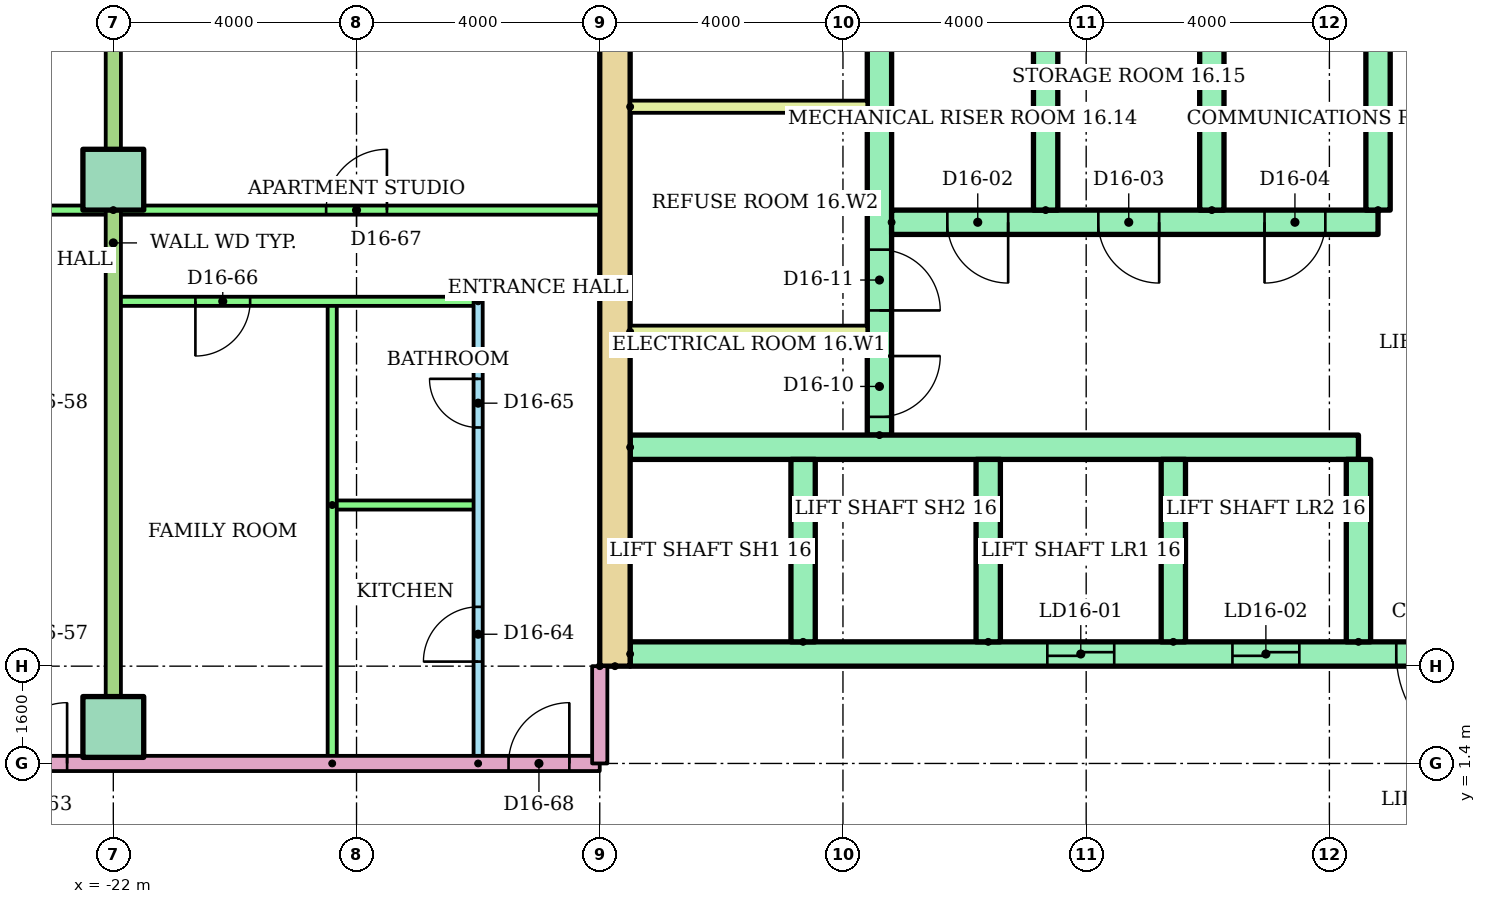
"""IFC4 building model, lengths in metres.
Left out: names, types, materials, properties, quantities, classifications, styles, units other than length and angle.
Written with IfcOpenShell. Run it as: python <this file> out.ifc"""

import sys

from ifc_helpers import new_model, si_unit, direction, frame, frame_2d, origin, origin_2d, place, context, subcontext, project, spatial, rectangle, extrude, element, fill, save


model = new_model("IFC4")
c1 = context("Model", 3, precision=1e-05, world=origin(), true_north=direction((0.0, 1.0)))
c2 = subcontext(c1, "Body", "Model", "MODEL_VIEW")
j1 = project(units=[si_unit("LENGTHUNIT", "METRE"), si_unit("PLANEANGLEUNIT", "RADIAN")], contexts=[c1])
p1 = place(None, origin())
s1 = spatial("IfcSite", under=j1, at=p1, CompositionType="ELEMENT")
p2 = place(p1, origin())
s2 = spatial("IfcBuilding", under=s1, at=p2, CompositionType="ELEMENT")
p3 = place(p2, frame((0.0, 0.0, 60.8)))
s3 = spatial("IfcBuildingStorey", under=s2, at=p3, CompositionType="ELEMENT", Elevation=60.8)
for number, where in (
    (1, (-22.0, 2.0, 0.0)),
    (2, (-22.0, 11.0, 0.0)),
):
    element("IfcColumn", number, at=place(p3, frame(where)), inside=s3, PredefinedType="COLUMN", context=c2, shape_type="SweptSolid", body=[
        extrude(rectangle(XDim=1.0, YDim=1.0, at=origin_2d()), origin(), (0.0, 0.0, 1.0), 3.2),
    ])
p4 = place(p3, frame((-13.75, 3.0, 0.0), z_axis=(0.0, 0.0, 1.0), x_axis=(0.0, 1.0, 0.0)))
e3 = element("IfcWall", 3, at=p4, inside=s3, PredefinedType="SHEAR", context=c2, shape_type="SweptSolid", body=[
    extrude(rectangle(XDim=17.0, YDim=0.5, at=frame_2d((8.5, 0.0))), origin(), (0.0, 0.0, 1.0), 2.8),
])
p5 = place(p3, frame((-9.4, 6.8, 0.0), z_axis=(0.0, 0.0, 1.0), x_axis=(0.0, 1.0, 0.0)))
e4 = element("IfcWall", 4, at=p5, inside=s3, PredefinedType="SHEAR", context=c2, shape_type="SweptSolid", body=[
    extrude(rectangle(XDim=12.7, YDim=0.4, at=frame_2d((6.35, 0.0))), origin(), (0.0, 0.0, 1.0), 2.8),
])
p6 = place(p5, frame((0.3, 0.0, 0.0)))
e5 = element("IfcOpeningElement", 5, at=p6, cuts=e4, PredefinedType="OPENING", context=c2, shape_type="SweptSolid", body=[
    extrude(rectangle(XDim=1.0, YDim=2.1, at=frame_2d((0.5, 1.05))), frame((0.0, 0.21, 0.0), z_axis=(0.0, -1.0, 0.0), x_axis=(1.0, 0.0, 0.0)), (0.0, 0.0, 1.0), 0.42),
])
p7 = place(p5, frame((2.05, 0.0, 0.0)))
e6 = element("IfcOpeningElement", 6, at=p7, cuts=e4, PredefinedType="OPENING", context=c2, shape_type="SweptSolid", body=[
    extrude(rectangle(XDim=1.0, YDim=2.1, at=frame_2d((0.5, 1.05))), frame((0.0, 0.21, 0.0), z_axis=(0.0, -1.0, 0.0), x_axis=(1.0, 0.0, 0.0)), (0.0, 0.0, 1.0), 0.42),
])
p8 = place(p5, frame((7.925, 0.0, 0.0)))
e7 = element("IfcOpeningElement", 7, at=p8, cuts=e4, PredefinedType="OPENING", context=c2, shape_type="SweptSolid", body=[
    extrude(rectangle(XDim=1.0, YDim=2.1, at=frame_2d((0.5, 1.05))), frame((0.0, 0.21, 0.0), z_axis=(0.0, -1.0, 0.0), x_axis=(1.0, 0.0, 0.0)), (0.0, 0.0, 1.0), 0.42),
])
p9 = place(p3, frame((-13.5, 3.2, 0.0)))
e8 = element("IfcWall", 8, at=p9, inside=s3, PredefinedType="SHEAR", context=c2, shape_type="SweptSolid", body=[
    extrude(rectangle(XDim=27.0, YDim=0.4, at=frame_2d((13.5, 0.0))), origin(), (0.0, 0.0, 1.0), 2.8),
])
p10 = place(p9, frame((6.861, 0.0, 0.0)))
e9 = element("IfcOpeningElement", 9, at=p10, cuts=e8, PredefinedType="OPENING", context=c2, shape_type="SweptSolid", body=[
    extrude(rectangle(XDim=1.1, YDim=2.1, at=frame_2d((0.55, 1.05))), frame((0.0, 0.21, 0.0), z_axis=(0.0, -1.0, 0.0), x_axis=(1.0, 0.0, 0.0)), (0.0, 0.0, 1.0), 0.42),
])
p11 = place(p9, frame((9.906, 0.0, 0.0)))
e10 = element("IfcOpeningElement", 10, at=p11, cuts=e8, PredefinedType="OPENING", context=c2, shape_type="SweptSolid", body=[
    extrude(rectangle(XDim=1.1, YDim=2.1, at=frame_2d((0.55, 1.05))), frame((0.0, 0.21, 0.0), z_axis=(0.0, -1.0, 0.0), x_axis=(1.0, 0.0, 0.0)), (0.0, 0.0, 1.0), 0.42),
])
p12 = place(p9, frame((15.994, 0.0, 0.0)))
e11 = element("IfcOpeningElement", 11, at=p12, cuts=e8, PredefinedType="OPENING", context=c2, shape_type="SweptSolid", body=[
    extrude(rectangle(XDim=1.1, YDim=2.1, at=frame_2d((0.55, 1.05))), frame((0.0, 0.21, 0.0), z_axis=(0.0, -1.0, 0.0), x_axis=(1.0, 0.0, 0.0)), (0.0, 0.0, 1.0), 0.42),
])
p13 = place(p9, frame((19.039, 0.0, 0.0)))
e12 = element("IfcOpeningElement", 12, at=p13, cuts=e8, PredefinedType="OPENING", context=c2, shape_type="SweptSolid", body=[
    extrude(rectangle(XDim=1.1, YDim=2.1, at=frame_2d((0.55, 1.05))), frame((0.0, 0.21, 0.0), z_axis=(0.0, -1.0, 0.0), x_axis=(1.0, 0.0, 0.0)), (0.0, 0.0, 1.0), 0.42),
])
p14 = place(p9, frame((12.6, 0.0, 0.0)))
e13 = element("IfcOpeningElement", 13, at=p14, cuts=e8, PredefinedType="OPENING", context=c2, shape_type="SweptSolid", body=[
    extrude(rectangle(XDim=1.8, YDim=2.1, at=frame_2d((0.9, 1.05))), frame((0.0, 0.21, 0.0), z_axis=(0.0, -1.0, 0.0), x_axis=(1.0, 0.0, 0.0)), (0.0, 0.0, 1.0), 0.42),
])
p15 = place(p3, frame((-13.5, 6.6, 0.0)))
e14 = element("IfcWall", 14, at=p15, inside=s3, PredefinedType="SHEAR", context=c2, shape_type="SweptSolid", body=[
    extrude(rectangle(XDim=11.978, YDim=0.4, at=frame_2d((5.989, 0.0))), origin(), (0.0, 0.0, 1.0), 2.8),
])
for number, where, z_axis, x_axis in (
    (15, (-10.656, 3.4, 0.0), (0.0, 0.0, 1.0), (0.0, 1.0, 0.0)),
    (16, (-7.611, 3.4, 0.0), (0.0, 0.0, 1.0), (0.0, 1.0, 0.0)),
    (17, (-4.567, 3.4, 0.0), (0.0, 0.0, 1.0), (0.0, 1.0, 0.0)),
    (18, (-1.522, 3.4, 0.0), (0.0, 0.0, 1.0), (0.0, 1.0, 0.0)),
):
    element("IfcWall", number, at=place(p3, frame(where, z_axis=z_axis, x_axis=x_axis)), inside=s3, PredefinedType="SHEAR", context=c2, shape_type="SweptSolid", body=[
        extrude(rectangle(XDim=3.0, YDim=0.4, at=frame_2d((1.5, 0.0))), origin(), (0.0, 0.0, 1.0), 2.8),
    ])
p16 = place(p3, frame((-9.2, 10.3, 0.0)))
e19 = element("IfcWall", 19, at=p16, inside=s3, PredefinedType="SHEAR", context=c2, shape_type="SweptSolid", body=[
    extrude(rectangle(XDim=8.0, YDim=0.4, at=frame_2d((4.0, 0.0))), origin(), (0.0, 0.0, 1.0), 2.8),
])
p17 = place(p16, frame((0.917, 0.0, 0.0)))
e20 = element("IfcOpeningElement", 20, at=p17, cuts=e19, PredefinedType="OPENING", context=c2, shape_type="SweptSolid", body=[
    extrude(rectangle(XDim=1.0, YDim=2.1, at=frame_2d((0.5, 1.05))), frame((0.0, 0.21, 0.0), z_axis=(0.0, -1.0, 0.0), x_axis=(1.0, 0.0, 0.0)), (0.0, 0.0, 1.0), 0.42),
])
p18 = place(p16, frame((3.4, 0.0, 0.0)))
e21 = element("IfcOpeningElement", 21, at=p18, cuts=e19, PredefinedType="OPENING", context=c2, shape_type="SweptSolid", body=[
    extrude(rectangle(XDim=1.0, YDim=2.1, at=frame_2d((0.5, 1.05))), frame((0.0, 0.21, 0.0), z_axis=(0.0, -1.0, 0.0), x_axis=(1.0, 0.0, 0.0)), (0.0, 0.0, 1.0), 0.42),
])
p19 = place(p16, frame((6.133, 0.0, 0.0)))
e22 = element("IfcOpeningElement", 22, at=p19, cuts=e19, PredefinedType="OPENING", context=c2, shape_type="SweptSolid", body=[
    extrude(rectangle(XDim=1.0, YDim=2.1, at=frame_2d((0.5, 1.05))), frame((0.0, 0.21, 0.0), z_axis=(0.0, -1.0, 0.0), x_axis=(1.0, 0.0, 0.0)), (0.0, 0.0, 1.0), 0.42),
])
for number, where, z_axis, x_axis in (
    (23, (-6.667, 10.5, 0.0), (0.0, 0.0, 1.0), (0.0, 1.0, 0.0)),
    (24, (-3.933, 10.5, 0.0), (0.0, 0.0, 1.0), (0.0, 1.0, 0.0)),
    (25, (-1.2, 10.5, 0.0), (0.0, 0.0, 1.0), (0.0, 1.0, 0.0)),
):
    element("IfcWall", number, at=place(p3, frame(where, z_axis=z_axis, x_axis=x_axis)), inside=s3, PredefinedType="SHEAR", context=c2, shape_type="SweptSolid", body=[
        extrude(rectangle(XDim=3.0, YDim=0.4, at=frame_2d((1.5, 0.0))), origin(), (0.0, 0.0, 1.0), 2.8),
    ])
for number, where in (
    (26, (-13.5, 8.5, 0.0)),
    (27, (-13.5, 12.2, 0.0)),
):
    element("IfcWall", number, at=place(p3, frame(where)), inside=s3, PredefinedType="PARTITIONING", context=c2, shape_type="SweptSolid", body=[
        extrude(rectangle(XDim=3.9, YDim=0.2, at=frame_2d((1.95, 0.0))), origin(), (0.0, 0.0, 1.0), 2.8),
    ])
p20 = place(p3, frame((-36.52, 10.5, 0.0)))
e28 = element("IfcWall", 28, at=p20, inside=s3, PredefinedType="PARTITIONING", context=c2, shape_type="SweptSolid", body=[
    extrude(rectangle(XDim=14.52, YDim=0.15, at=frame_2d((7.26, 0.0))), origin(), (0.0, 0.0, 1.0), 2.4),
])
p21 = place(p20, frame((1.97, 0.0, 0.0)))
e29 = element("IfcOpeningElement", 29, at=p21, cuts=e28, PredefinedType="OPENING", context=c2, shape_type="SweptSolid", body=[
    extrude(rectangle(XDim=1.0, YDim=2.1, at=frame_2d((0.5, 1.05))), frame((0.0, 0.085, 0.0), z_axis=(0.0, -1.0, 0.0), x_axis=(1.0, 0.0, 0.0)), (0.0, 0.0, 1.0), 0.17),
])
p22 = place(p20, frame((9.12, 0.0, 0.0)))
e30 = element("IfcOpeningElement", 30, at=p22, cuts=e28, PredefinedType="OPENING", context=c2, shape_type="SweptSolid", body=[
    extrude(rectangle(XDim=1.0, YDim=2.1, at=frame_2d((0.5, 1.05))), frame((0.0, 0.085, 0.0), z_axis=(0.0, -1.0, 0.0), x_axis=(1.0, 0.0, 0.0)), (0.0, 0.0, 1.0), 0.17),
])
p23 = place(p3, frame((-16.0, 1.4, 0.0), z_axis=(0.0, 0.0, 1.0), x_axis=(0.0, 1.0, 0.0)))
e31 = element("IfcWall", 31, at=p23, inside=s3, PredefinedType="PARTITIONING", context=c2, shape_type="SweptSolid", body=[
    extrude(rectangle(XDim=7.6, YDim=0.15, at=frame_2d((3.8, 0.0))), origin(), (0.0, 0.0, 1.0), 2.4),
])
p24 = place(p23, frame((1.675, 0.0, 0.0)))
e32 = element("IfcOpeningElement", 32, at=p24, cuts=e31, PredefinedType="OPENING", context=c2, shape_type="SweptSolid", body=[
    extrude(rectangle(XDim=0.9, YDim=2.1, at=frame_2d((0.45, 1.05))), frame((0.0, 0.085, 0.0), z_axis=(0.0, -1.0, 0.0), x_axis=(1.0, 0.0, 0.0)), (0.0, 0.0, 1.0), 0.17),
])
p25 = place(p23, frame((5.525, 0.0, 0.0)))
e33 = element("IfcOpeningElement", 33, at=p25, cuts=e31, PredefinedType="OPENING", context=c2, shape_type="SweptSolid", body=[
    extrude(rectangle(XDim=0.8, YDim=2.1, at=frame_2d((0.4, 1.05))), frame((0.0, 0.085, 0.0), z_axis=(0.0, -1.0, 0.0), x_axis=(1.0, 0.0, 0.0)), (0.0, 0.0, 1.0), 0.17),
])
p26 = place(p3, frame((-18.4, 5.65, 0.0)))
e34 = element("IfcWall", 34, at=p26, inside=s3, PredefinedType="PARTITIONING", context=c2, shape_type="SweptSolid", body=[
    extrude(rectangle(XDim=2.4, YDim=0.15, at=frame_2d((1.2, 0.0))), origin(), (0.0, 0.0, 1.0), 2.4),
])
p27 = place(p3, frame((-18.4, 1.4, 0.0), z_axis=(0.0, 0.0, 1.0), x_axis=(0.0, 1.0, 0.0)))
e35 = element("IfcWall", 35, at=p27, inside=s3, PredefinedType="PARTITIONING", context=c2, shape_type="SweptSolid", body=[
    extrude(rectangle(XDim=7.6, YDim=0.15, at=frame_2d((3.8, 0.0))), origin(), (0.0, 0.0, 1.0), 2.4),
])
p28 = place(p3, frame((-16.0, 9.0, 0.0), z_axis=(0.0, 0.0, 1.0), x_axis=(-1.0, 0.0, 0.0)))
e36 = element("IfcWall", 36, at=p28, inside=s3, PredefinedType="PARTITIONING", context=c2, shape_type="SweptSolid", body=[
    extrude(rectangle(XDim=6.0, YDim=0.15, at=frame_2d((3.0, 0.0))), origin(), (0.0, 0.0, 1.0), 2.4),
])
p29 = place(p28, frame((3.75, 0.0, 0.0)))
e37 = element("IfcOpeningElement", 37, at=p29, cuts=e36, PredefinedType="OPENING", context=c2, shape_type="SweptSolid", body=[
    extrude(rectangle(XDim=0.9, YDim=2.1, at=frame_2d((0.45, 1.05))), frame((0.0, 0.085, 0.0), z_axis=(0.0, -1.0, 0.0), x_axis=(1.0, 0.0, 0.0)), (0.0, 0.0, 1.0), 0.17),
])
p30 = place(p3, frame((-22.0, 10.5, 0.0)))
e38 = element("IfcWall", 38, at=p30, inside=s3, PredefinedType="PARTITIONING", context=c2, shape_type="SweptSolid", body=[
    extrude(rectangle(XDim=8.0, YDim=0.15, at=frame_2d((4.0, 0.0))), origin(), (0.0, 0.0, 1.0), 2.4),
])
p31 = place(p30, frame((3.5, 0.0, 0.0)))
e39 = element("IfcOpeningElement", 39, at=p31, cuts=e38, PredefinedType="OPENING", context=c2, shape_type="SweptSolid", body=[
    extrude(rectangle(XDim=1.0, YDim=2.1, at=frame_2d((0.5, 1.05))), frame((0.0, 0.085, 0.0), z_axis=(0.0, -1.0, 0.0), x_axis=(1.0, 0.0, 0.0)), (0.0, 0.0, 1.0), 0.17),
])
p32 = place(p3, frame((-22.0, 18.521, 0.0), z_axis=(0.0, 0.0, 1.0), x_axis=(0.0, -1.0, 0.0)))
e40 = element("IfcWall", 40, at=p32, inside=s3, PredefinedType="PARTITIONING", context=c2, shape_type="SweptSolid", body=[
    extrude(rectangle(XDim=17.121, YDim=0.25, at=frame_2d((8.561, 0.0))), origin(), (0.0, 0.0, 1.0), 2.4),
])
p33 = place(p3, frame((-29.0, 1.4, 0.0)))
e41 = element("IfcWall", 41, at=p33, inside=s3, PredefinedType="PARTITIONING", context=c2, shape_type="SweptSolid", body=[
    extrude(rectangle(XDim=15.0, YDim=0.25, at=frame_2d((7.5, 0.0))), origin(), (0.0, 0.0, 1.0), 2.4),
])
p34 = place(p33, frame((5.24, 0.0, 0.0)))
e42 = element("IfcOpeningElement", 42, at=p34, cuts=e41, PredefinedType="OPENING", context=c2, shape_type="SweptSolid", body=[
    extrude(rectangle(XDim=1.0, YDim=2.1, at=frame_2d((0.5, 1.05))), frame((0.0, 0.135, 0.0), z_axis=(0.0, -1.0, 0.0), x_axis=(1.0, 0.0, 0.0)), (0.0, 0.0, 1.0), 0.27),
])
p35 = place(p33, frame((13.5, 0.0, 0.0)))
e43 = element("IfcOpeningElement", 43, at=p35, cuts=e41, PredefinedType="OPENING", context=c2, shape_type="SweptSolid", body=[
    extrude(rectangle(XDim=1.0, YDim=2.1, at=frame_2d((0.5, 1.05))), frame((0.0, 0.135, 0.0), z_axis=(0.0, -1.0, 0.0), x_axis=(1.0, 0.0, 0.0)), (0.0, 0.0, 1.0), 0.27),
])
p36 = place(p3, frame((-14.0, 3.0, 0.0), z_axis=(0.0, 0.0, 1.0), x_axis=(0.0, -1.0, 0.0)))
e44 = element("IfcWall", 44, at=p36, inside=s3, PredefinedType="PARTITIONING", context=c2, shape_type="SweptSolid", body=[
    extrude(rectangle(XDim=1.6, YDim=0.25, at=frame_2d((0.8, 0.0))), origin(), (0.0, 0.0, 1.0), 2.4),
])
p37 = place(p10, origin())
e45 = element("IfcDoor", 45, at=p37, inside=s3, OperationType="SLIDING_TO_LEFT", PredefinedType="DOOR", context=c2, shape_type="SweptSolid", body=[
    extrude(rectangle(XDim=1.1, YDim=2.1, at=frame_2d((0.55, 1.05))), frame((0.0, 0.025, 0.0), z_axis=(0.0, -1.0, 0.0), x_axis=(1.0, 0.0, 0.0)), (0.0, 0.0, 1.0), 0.05),
])
fill(e9, e45)
p38 = place(p11, origin())
e46 = element("IfcDoor", 46, at=p38, inside=s3, OperationType="SLIDING_TO_LEFT", PredefinedType="DOOR", context=c2, shape_type="SweptSolid", body=[
    extrude(rectangle(XDim=1.1, YDim=2.1, at=frame_2d((0.55, 1.05))), frame((0.0, 0.025, 0.0), z_axis=(0.0, -1.0, 0.0), x_axis=(1.0, 0.0, 0.0)), (0.0, 0.0, 1.0), 0.05),
])
fill(e10, e46)
p39 = place(p14, frame((1.8, 0.0, 0.0), z_axis=(0.0, 0.0, 1.0), x_axis=(-1.0, 0.0, 0.0)))
e47 = element("IfcDoor", 47, at=p39, inside=s3, OperationType="DOUBLE_DOOR_SINGLE_SWING", PredefinedType="DOOR", context=c2, shape_type="SweptSolid", body=[
    extrude(rectangle(XDim=1.8, YDim=2.1, at=frame_2d((0.9, 1.05))), frame((0.0, 0.025, 0.0), z_axis=(0.0, -1.0, 0.0), x_axis=(1.0, 0.0, 0.0)), (0.0, 0.0, 1.0), 0.05),
])
fill(e13, e47)
p40 = place(p17, frame((1.0, 0.0, 0.0), z_axis=(0.0, 0.0, 1.0), x_axis=(-1.0, 0.0, 0.0)))
e48 = element("IfcDoor", 48, at=p40, inside=s3, OperationType="SINGLE_SWING_RIGHT", PredefinedType="DOOR", context=c2, shape_type="SweptSolid", body=[
    extrude(rectangle(XDim=1.0, YDim=2.1, at=frame_2d((0.5, 1.05))), frame((0.0, 0.025, 0.0), z_axis=(0.0, -1.0, 0.0), x_axis=(1.0, 0.0, 0.0)), (0.0, 0.0, 1.0), 0.05),
])
fill(e20, e48)
p41 = place(p18, frame((1.0, 0.0, 0.0), z_axis=(0.0, 0.0, 1.0), x_axis=(-1.0, 0.0, 0.0)))
e49 = element("IfcDoor", 49, at=p41, inside=s3, OperationType="SINGLE_SWING_RIGHT", PredefinedType="DOOR", context=c2, shape_type="SweptSolid", body=[
    extrude(rectangle(XDim=1.0, YDim=2.1, at=frame_2d((0.5, 1.05))), frame((0.0, 0.025, 0.0), z_axis=(0.0, -1.0, 0.0), x_axis=(1.0, 0.0, 0.0)), (0.0, 0.0, 1.0), 0.05),
])
fill(e21, e49)
p42 = place(p19, frame((1.0, 0.0, 0.0), z_axis=(0.0, 0.0, 1.0), x_axis=(-1.0, 0.0, 0.0)))
e50 = element("IfcDoor", 50, at=p42, inside=s3, OperationType="SINGLE_SWING_LEFT", PredefinedType="DOOR", context=c2, shape_type="SweptSolid", body=[
    extrude(rectangle(XDim=1.0, YDim=2.1, at=frame_2d((0.5, 1.05))), frame((0.0, 0.025, 0.0), z_axis=(0.0, -1.0, 0.0), x_axis=(1.0, 0.0, 0.0)), (0.0, 0.0, 1.0), 0.05),
])
fill(e22, e50)
p43 = place(p6, frame((1.0, 0.0, 0.0), z_axis=(0.0, 0.0, 1.0), x_axis=(-1.0, 0.0, 0.0)))
e51 = element("IfcDoor", 51, at=p43, inside=s3, OperationType="SINGLE_SWING_RIGHT", PredefinedType="DOOR", context=c2, shape_type="SweptSolid", body=[
    extrude(rectangle(XDim=1.0, YDim=2.1, at=frame_2d((0.5, 1.05))), frame((0.0, 0.025, 0.0), z_axis=(0.0, -1.0, 0.0), x_axis=(1.0, 0.0, 0.0)), (0.0, 0.0, 1.0), 0.05),
])
fill(e5, e51)
p44 = place(p7, frame((1.0, 0.0, 0.0), z_axis=(0.0, 0.0, 1.0), x_axis=(-1.0, 0.0, 0.0)))
e52 = element("IfcDoor", 52, at=p44, inside=s3, OperationType="SINGLE_SWING_LEFT", PredefinedType="DOOR", context=c2, shape_type="SweptSolid", body=[
    extrude(rectangle(XDim=1.0, YDim=2.1, at=frame_2d((0.5, 1.05))), frame((0.0, 0.025, 0.0), z_axis=(0.0, -1.0, 0.0), x_axis=(1.0, 0.0, 0.0)), (0.0, 0.0, 1.0), 0.05),
])
fill(e6, e52)
p45 = place(p34, origin())
e53 = element("IfcDoor", 53, at=p45, inside=s3, OperationType="SINGLE_SWING_RIGHT", PredefinedType="DOOR", context=c2, shape_type="SweptSolid", body=[
    extrude(rectangle(XDim=1.0, YDim=2.1, at=frame_2d((0.5, 1.05))), frame((0.0, 0.025, 0.0), z_axis=(0.0, -1.0, 0.0), x_axis=(1.0, 0.0, 0.0)), (0.0, 0.0, 1.0), 0.05),
])
fill(e42, e53)
p46 = place(p24, origin())
e54 = element("IfcDoor", 54, at=p46, inside=s3, OperationType="SINGLE_SWING_LEFT", PredefinedType="DOOR", context=c2, shape_type="SweptSolid", body=[
    extrude(rectangle(XDim=0.9, YDim=2.1, at=frame_2d((0.45, 1.05))), frame((0.0, 0.025, 0.0), z_axis=(0.0, -1.0, 0.0), x_axis=(1.0, 0.0, 0.0)), (0.0, 0.0, 1.0), 0.05),
])
fill(e32, e54)
p47 = place(p25, origin())
e55 = element("IfcDoor", 55, at=p47, inside=s3, OperationType="SINGLE_SWING_RIGHT", PredefinedType="DOOR", context=c2, shape_type="SweptSolid", body=[
    extrude(rectangle(XDim=0.8, YDim=2.1, at=frame_2d((0.4, 1.05))), frame((0.0, 0.025, 0.0), z_axis=(0.0, -1.0, 0.0), x_axis=(1.0, 0.0, 0.0)), (0.0, 0.0, 1.0), 0.05),
])
fill(e33, e55)
p48 = place(p29, origin())
e56 = element("IfcDoor", 56, at=p48, inside=s3, OperationType="SINGLE_SWING_RIGHT", PredefinedType="DOOR", context=c2, shape_type="SweptSolid", body=[
    extrude(rectangle(XDim=0.9, YDim=2.1, at=frame_2d((0.45, 1.05))), frame((0.0, 0.025, 0.0), z_axis=(0.0, -1.0, 0.0), x_axis=(1.0, 0.0, 0.0)), (0.0, 0.0, 1.0), 0.05),
])
fill(e37, e56)
p49 = place(p31, origin())
e57 = element("IfcDoor", 57, at=p49, inside=s3, OperationType="SINGLE_SWING_RIGHT", PredefinedType="DOOR", context=c2, shape_type="SweptSolid", body=[
    extrude(rectangle(XDim=1.0, YDim=2.1, at=frame_2d((0.5, 1.05))), frame((0.0, 0.025, 0.0), z_axis=(0.0, -1.0, 0.0), x_axis=(1.0, 0.0, 0.0)), (0.0, 0.0, 1.0), 0.05),
])
fill(e39, e57)
p50 = place(p35, origin())
e58 = element("IfcDoor", 58, at=p50, inside=s3, OperationType="SINGLE_SWING_RIGHT", PredefinedType="DOOR", context=c2, shape_type="SweptSolid", body=[
    extrude(rectangle(XDim=1.0, YDim=2.1, at=frame_2d((0.5, 1.05))), frame((0.0, 0.025, 0.0), z_axis=(0.0, -1.0, 0.0), x_axis=(1.0, 0.0, 0.0)), (0.0, 0.0, 1.0), 0.05),
])
fill(e43, e58)
save(model, sys.argv[1])
